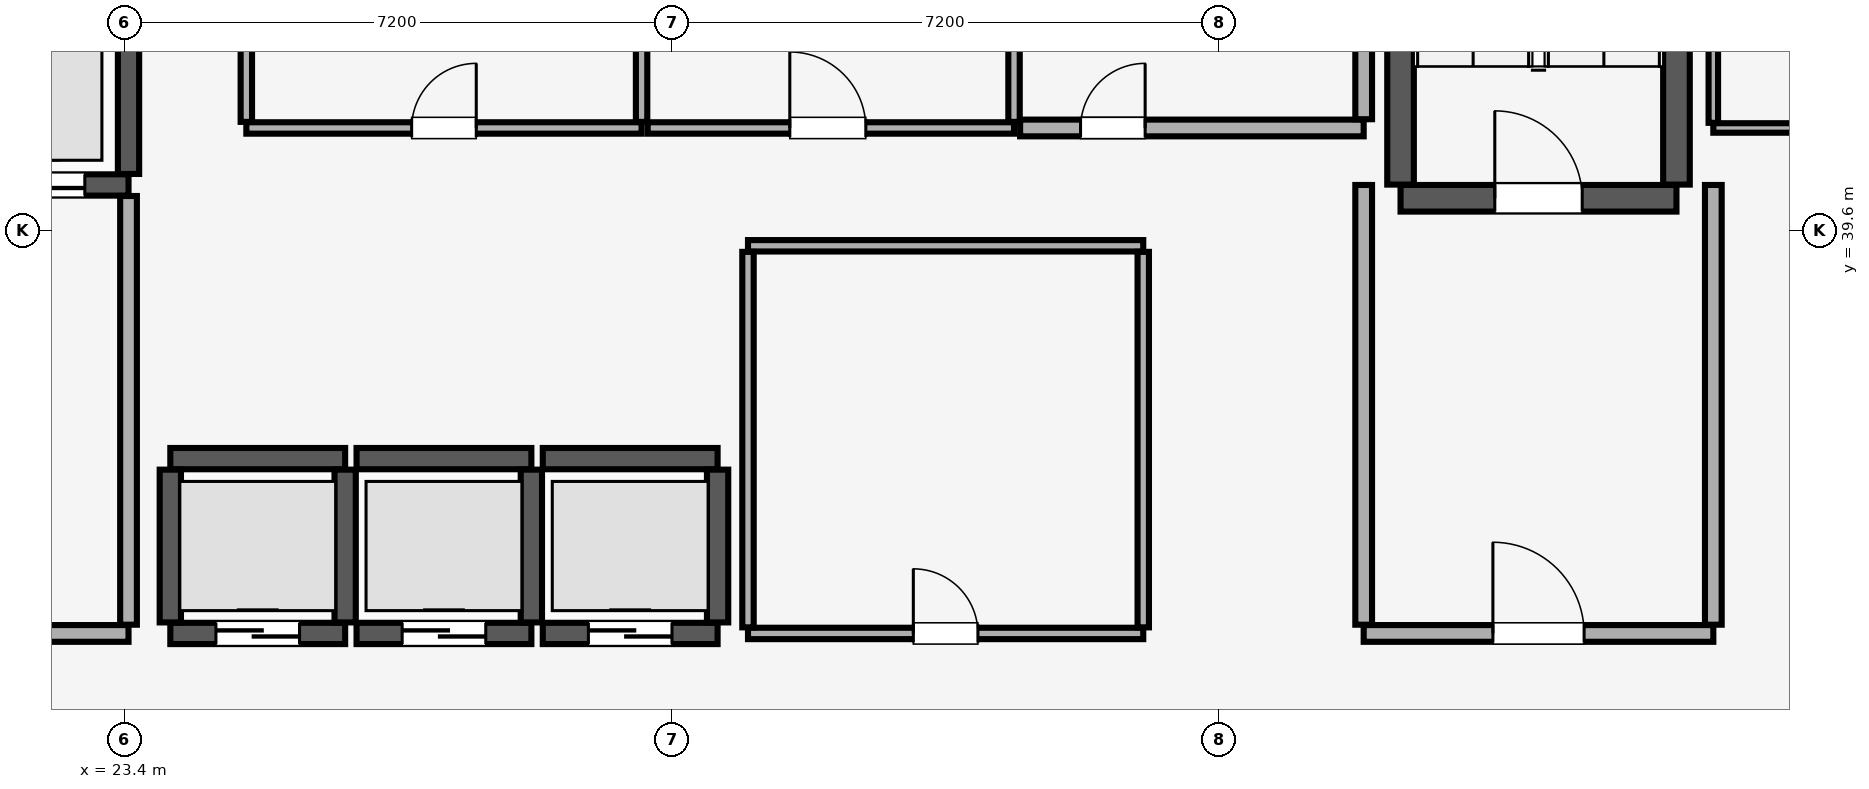
"""IFC4 building model, lengths in metres.
Left out: names, types, materials, properties, quantities, classifications, styles, units other than length and angle.
Written with IfcOpenShell. Run it as: python <this file> out.ifc"""

import sys

from ifc_helpers import new_model, si_unit, direction, frame, frame_2d, origin, place, context, subcontext, project, spatial, rectangle, extrude, element, fill, save


model = new_model("IFC4")
c1 = context("Model", 3, precision=1e-05, world=origin(), true_north=direction((0.0, 1.0)))
c2 = subcontext(c1, "Body", "Model", "MODEL_VIEW")
j1 = project(units=[si_unit("LENGTHUNIT", "METRE"), si_unit("PLANEANGLEUNIT", "RADIAN")], contexts=[c1])
p1 = place(None, origin())
s1 = spatial("IfcSite", under=j1, at=p1, CompositionType="ELEMENT")
p2 = place(p1, origin())
s2 = spatial("IfcBuilding", under=s1, at=p2, CompositionType="ELEMENT")
p3 = place(p2, frame((0.0, 0.0, 35.15)))
s3 = spatial("IfcBuildingStorey", under=s2, at=p3, CompositionType="ELEMENT", Elevation=35.15)
p4 = place(p3, frame((40.185, 40.025, 0.0), z_axis=(0.0, 0.0, 1.0), x_axis=(1.0, 0.0, 0.0)))
e1 = element("IfcWall", 1, at=p4, inside=s3, PredefinedType="SHEAR", context=c2, shape_type="SweptSolid", body=[
    extrude(rectangle(XDim=3.63, YDim=0.35, at=frame_2d((1.815, 0.0))), origin(), (0.0, 0.0, 1.0), 3.51),
])
p5 = place(p4, frame((1.24, 0.0, 0.0)))
e2 = element("IfcOpeningElement", 2, at=p5, cuts=e1, PredefinedType="OPENING", context=c2, shape_type="SweptSolid", body=[
    extrude(rectangle(XDim=1.15, YDim=2.15, at=frame_2d((0.575, 1.075))), frame((0.0, 0.185, 0.0), z_axis=(0.0, -1.0, 0.0), x_axis=(1.0, 0.0, 0.0)), (0.0, 0.0, 1.0), 0.37),
])
for number, where, z_axis, x_axis in (
    (3, (40.185, 40.205, 0.0), (0.0, 0.0, 1.0), (0.0, 1.0, 0.0)),
    (4, (43.815, 40.205, 0.0), (0.0, 0.0, 1.0), (0.0, 1.0, 0.0)),
):
    element("IfcWall", number, at=place(p3, frame(where, z_axis=z_axis, x_axis=x_axis)), inside=s3, PredefinedType="SHEAR", context=c2, shape_type="SweptSolid", body=[
        extrude(rectangle(XDim=8.09, YDim=0.35, at=frame_2d((4.045, 0.0))), origin(), (0.0, 0.0, 1.0), 3.51),
    ])
p6 = place(p3, frame((24.0, 34.3, 0.0), z_axis=(0.0, 0.0, 1.0), x_axis=(1.0, 0.0, 0.0)))
e5 = element("IfcWall", 5, at=p6, inside=s3, PredefinedType="SHEAR", context=c2, shape_type="SweptSolid", body=[
    extrude(rectangle(XDim=2.3, YDim=0.28, at=frame_2d((1.15, 0.0))), origin(), (0.0, 0.0, 1.0), 3.51),
])
p7 = place(p6, frame((0.6, 0.0, 0.0)))
e6 = element("IfcOpeningElement", 6, at=p7, cuts=e5, PredefinedType="OPENING", context=c2, shape_type="SweptSolid", body=[
    extrude(rectangle(XDim=1.1, YDim=2.2, at=frame_2d((0.55, 1.1))), frame((0.0, 0.15, 0.0), z_axis=(0.0, -1.0, 0.0), x_axis=(1.0, 0.0, 0.0)), (0.0, 0.0, 1.0), 0.3),
])
p8 = place(p3, frame((24.0, 36.6, 0.0), z_axis=(0.0, 0.0, 1.0), x_axis=(1.0, 0.0, 0.0)))
e7 = element("IfcWall", 7, at=p8, inside=s3, PredefinedType="SHEAR", context=c2, shape_type="SweptSolid", body=[
    extrude(rectangle(XDim=2.3, YDim=0.28, at=frame_2d((1.15, 0.0))), origin(), (0.0, 0.0, 1.0), 3.51),
])
for number, where, z_axis, x_axis in (
    (8, (24.0, 34.445, 0.0), (0.0, 0.0, 1.0), (0.0, 1.0, 0.0)),
    (9, (26.3, 34.445, 0.0), (0.0, 0.0, 1.0), (0.0, 1.0, 0.0)),
):
    element("IfcWall", number, at=place(p3, frame(where, z_axis=z_axis, x_axis=x_axis)), inside=s3, PredefinedType="SHEAR", context=c2, shape_type="SweptSolid", body=[
        extrude(rectangle(XDim=2.01, YDim=0.28, at=frame_2d((1.005, 0.0))), origin(), (0.0, 0.0, 1.0), 3.51),
    ])
p9 = place(p3, frame((26.45, 34.3, 0.0), z_axis=(0.0, 0.0, 1.0), x_axis=(1.0, 0.0, 0.0)))
e10 = element("IfcWall", 10, at=p9, inside=s3, PredefinedType="SHEAR", context=c2, shape_type="SweptSolid", body=[
    extrude(rectangle(XDim=2.3, YDim=0.28, at=frame_2d((1.15, 0.0))), origin(), (0.0, 0.0, 1.0), 3.51),
])
p10 = place(p9, frame((0.6, 0.0, 0.0)))
e11 = element("IfcOpeningElement", 11, at=p10, cuts=e10, PredefinedType="OPENING", context=c2, shape_type="SweptSolid", body=[
    extrude(rectangle(XDim=1.1, YDim=2.2, at=frame_2d((0.55, 1.1))), frame((0.0, 0.15, 0.0), z_axis=(0.0, -1.0, 0.0), x_axis=(1.0, 0.0, 0.0)), (0.0, 0.0, 1.0), 0.3),
])
p11 = place(p3, frame((26.45, 36.6, 0.0), z_axis=(0.0, 0.0, 1.0), x_axis=(1.0, 0.0, 0.0)))
e12 = element("IfcWall", 12, at=p11, inside=s3, PredefinedType="SHEAR", context=c2, shape_type="SweptSolid", body=[
    extrude(rectangle(XDim=2.3, YDim=0.28, at=frame_2d((1.15, 0.0))), origin(), (0.0, 0.0, 1.0), 3.51),
])
p12 = place(p3, frame((28.75, 34.445, 0.0), z_axis=(0.0, 0.0, 1.0), x_axis=(0.0, 1.0, 0.0)))
e13 = element("IfcWall", 13, at=p12, inside=s3, PredefinedType="SHEAR", context=c2, shape_type="SweptSolid", body=[
    extrude(rectangle(XDim=2.01, YDim=0.28, at=frame_2d((1.005, 0.0))), origin(), (0.0, 0.0, 1.0), 3.51),
])
p13 = place(p3, frame((28.9, 34.3, 0.0), z_axis=(0.0, 0.0, 1.0), x_axis=(1.0, 0.0, 0.0)))
e14 = element("IfcWall", 14, at=p13, inside=s3, PredefinedType="SHEAR", context=c2, shape_type="SweptSolid", body=[
    extrude(rectangle(XDim=2.3, YDim=0.28, at=frame_2d((1.15, 0.0))), origin(), (0.0, 0.0, 1.0), 3.51),
])
p14 = place(p13, frame((0.6, 0.0, 0.0)))
e15 = element("IfcOpeningElement", 15, at=p14, cuts=e14, PredefinedType="OPENING", context=c2, shape_type="SweptSolid", body=[
    extrude(rectangle(XDim=1.1, YDim=2.2, at=frame_2d((0.55, 1.1))), frame((0.0, 0.15, 0.0), z_axis=(0.0, -1.0, 0.0), x_axis=(1.0, 0.0, 0.0)), (0.0, 0.0, 1.0), 0.3),
])
p15 = place(p3, frame((28.9, 36.6, 0.0), z_axis=(0.0, 0.0, 1.0), x_axis=(1.0, 0.0, 0.0)))
e16 = element("IfcWall", 16, at=p15, inside=s3, PredefinedType="SHEAR", context=c2, shape_type="SweptSolid", body=[
    extrude(rectangle(XDim=2.3, YDim=0.28, at=frame_2d((1.15, 0.0))), origin(), (0.0, 0.0, 1.0), 3.51),
])
p16 = place(p3, frame((31.2, 34.445, 0.0), z_axis=(0.0, 0.0, 1.0), x_axis=(0.0, 1.0, 0.0)))
e17 = element("IfcWall", 17, at=p16, inside=s3, PredefinedType="SHEAR", context=c2, shape_type="SweptSolid", body=[
    extrude(rectangle(XDim=2.01, YDim=0.28, at=frame_2d((1.005, 0.0))), origin(), (0.0, 0.0, 1.0), 3.51),
])
p17 = place(p3, frame((21.035, 40.2, 0.0), z_axis=(0.0, 0.0, 1.0), x_axis=(1.0, 0.0, 0.0)))
e18 = element("IfcWall", 18, at=p17, inside=s3, PredefinedType="SHEAR", context=c2, shape_type="SweptSolid", body=[
    extrude(rectangle(XDim=2.415, YDim=0.28, at=frame_2d((1.208, 0.0))), origin(), (0.0, 0.0, 1.0), 3.51),
])
p18 = place(p17, frame((0.54, 0.0, 0.0)))
e19 = element("IfcOpeningElement", 19, at=p18, cuts=e18, PredefinedType="OPENING", context=c2, shape_type="SweptSolid", body=[
    extrude(rectangle(XDim=1.3, YDim=2.3, at=frame_2d((0.65, 1.15))), frame((0.0, 0.15, 0.0), z_axis=(0.0, -1.0, 0.0), x_axis=(1.0, 0.0, 0.0)), (0.0, 0.0, 1.0), 0.3),
])
p19 = place(p3, frame((23.45, 40.345, 0.0), z_axis=(0.0, 0.0, 1.0), x_axis=(0.0, 1.0, 0.0)))
e20 = element("IfcWall", 20, at=p19, inside=s3, PredefinedType="SHEAR", context=c2, shape_type="SweptSolid", body=[
    extrude(rectangle(XDim=2.81, YDim=0.28, at=frame_2d((1.405, 0.0))), origin(), (0.0, 0.0, 1.0), 3.51),
])
p20 = place(p3, frame((17.4, 34.3, 0.0), z_axis=(0.0, 0.0, 1.0), x_axis=(1.0, 0.0, 0.0)))
e21 = element("IfcWall", 21, at=p20, inside=s3, PredefinedType="PARTITIONING", context=c2, shape_type="SweptSolid", body=[
    extrude(rectangle(XDim=6.05, YDim=0.22, at=frame_2d((3.025, 0.0))), origin(), (0.0, 0.0, 1.0), 3.51),
])
p21 = place(p20, frame((2.2, 0.0, 0.0)))
e22 = element("IfcOpeningElement", 22, at=p21, cuts=e21, PredefinedType="OPENING", context=c2, shape_type="SweptSolid", body=[
    extrude(rectangle(XDim=1.2, YDim=2.15, at=frame_2d((0.6, 1.075))), frame((0.0, 0.12, 0.0), z_axis=(0.0, -1.0, 0.0), x_axis=(1.0, 0.0, 0.0)), (0.0, 0.0, 1.0), 0.24),
])
p22 = place(p3, frame((23.45, 34.415, 0.0), z_axis=(0.0, 0.0, 1.0), x_axis=(0.0, 1.0, 0.0)))
e23 = element("IfcWall", 23, at=p22, inside=s3, PredefinedType="PARTITIONING", context=c2, shape_type="SweptSolid", body=[
    extrude(rectangle(XDim=5.64, YDim=0.22, at=frame_2d((2.82, 0.0))), origin(), (0.0, 0.0, 1.0), 3.51),
])
p23 = place(p3, frame((39.7, 34.3, 0.0), z_axis=(0.0, 0.0, 1.0), x_axis=(1.0, 0.0, 0.0)))
e24 = element("IfcWall", 24, at=p23, inside=s3, PredefinedType="PARTITIONING", context=c2, shape_type="SweptSolid", body=[
    extrude(rectangle(XDim=4.6, YDim=0.22, at=frame_2d((2.3, 0.0))), origin(), (0.0, 0.0, 1.0), 3.51),
])
p24 = place(p23, frame((1.7, 0.0, 0.0)))
e25 = element("IfcOpeningElement", 25, at=p24, cuts=e24, PredefinedType="OPENING", context=c2, shape_type="SweptSolid", body=[
    extrude(rectangle(XDim=1.2, YDim=2.15, at=frame_2d((0.6, 1.075))), frame((0.0, 0.12, 0.0), z_axis=(0.0, -1.0, 0.0), x_axis=(1.0, 0.0, 0.0)), (0.0, 0.0, 1.0), 0.24),
])
for number, where, z_axis, x_axis in (
    (26, (39.7, 34.415, 0.0), (0.0, 0.0, 1.0), (0.0, 1.0, 0.0)),
    (27, (44.3, 34.415, 0.0), (0.0, 0.0, 1.0), (0.0, 1.0, 0.0)),
):
    element("IfcWall", number, at=place(p3, frame(where, z_axis=z_axis, x_axis=x_axis)), inside=s3, PredefinedType="PARTITIONING", context=c2, shape_type="SweptSolid", body=[
        extrude(rectangle(XDim=5.785, YDim=0.22, at=frame_2d((2.893, 0.0))), origin(), (0.0, 0.0, 1.0), 3.51),
    ])
p25 = place(p3, frame((31.6, 34.3, 0.0), z_axis=(0.0, 0.0, 1.0), x_axis=(1.0, 0.0, 0.0)))
e28 = element("IfcWall", 28, at=p25, inside=s3, PredefinedType="PARTITIONING", context=c2, shape_type="SweptSolid", body=[
    extrude(rectangle(XDim=5.2, YDim=0.15, at=frame_2d((2.6, 0.0))), origin(), (0.0, 0.0, 1.0), 3.51),
])
p26 = place(p25, frame((2.175, 0.0, 0.0)))
e29 = element("IfcOpeningElement", 29, at=p26, cuts=e28, PredefinedType="OPENING", context=c2, shape_type="SweptSolid", body=[
    extrude(rectangle(XDim=0.85, YDim=2.1, at=frame_2d((0.425, 1.05))), frame((0.0, 0.085, 0.0), z_axis=(0.0, -1.0, 0.0), x_axis=(1.0, 0.0, 0.0)), (0.0, 0.0, 1.0), 0.17),
])
p27 = place(p3, frame((31.6, 39.4, 0.0), z_axis=(0.0, 0.0, 1.0), x_axis=(1.0, 0.0, 0.0)))
e30 = element("IfcWall", 30, at=p27, inside=s3, PredefinedType="PARTITIONING", context=c2, shape_type="SweptSolid", body=[
    extrude(rectangle(XDim=5.2, YDim=0.15, at=frame_2d((2.6, 0.0))), origin(), (0.0, 0.0, 1.0), 3.51),
])
for number, where, z_axis, x_axis in (
    (31, (31.6, 34.38, 0.0), (0.0, 0.0, 1.0), (0.0, 1.0, 0.0)),
    (32, (36.8, 34.38, 0.0), (0.0, 0.0, 1.0), (0.0, 1.0, 0.0)),
):
    element("IfcWall", number, at=place(p3, frame(where, z_axis=z_axis, x_axis=x_axis)), inside=s3, PredefinedType="PARTITIONING", context=c2, shape_type="SweptSolid", body=[
        extrude(rectangle(XDim=4.94, YDim=0.15, at=frame_2d((2.47, 0.0))), origin(), (0.0, 0.0, 1.0), 3.51),
    ])
p28 = place(p3, frame((25.0, 40.95, 0.0), z_axis=(0.0, 0.0, 1.0), x_axis=(1.0, 0.0, 0.0)))
e33 = element("IfcWall", 33, at=p28, inside=s3, PredefinedType="PARTITIONING", context=c2, shape_type="SweptSolid", body=[
    extrude(rectangle(XDim=5.2, YDim=0.15, at=frame_2d((2.6, 0.0))), origin(), (0.0, 0.0, 1.0), 3.51),
])
p29 = place(p28, frame((2.175, 0.0, 0.0)))
e34 = element("IfcOpeningElement", 34, at=p29, cuts=e33, PredefinedType="OPENING", context=c2, shape_type="SweptSolid", body=[
    extrude(rectangle(XDim=0.85, YDim=2.1, at=frame_2d((0.425, 1.05))), frame((0.0, 0.085, 0.0), z_axis=(0.0, -1.0, 0.0), x_axis=(1.0, 0.0, 0.0)), (0.0, 0.0, 1.0), 0.17),
])
for number, where, z_axis, x_axis in (
    (35, (25.0, 41.03, 0.0), (0.0, 0.0, 1.0), (0.0, 1.0, 0.0)),
    (36, (30.2, 41.03, 0.0), (0.0, 0.0, 1.0), (0.0, 1.0, 0.0)),
):
    element("IfcWall", number, at=place(p3, frame(where, z_axis=z_axis, x_axis=x_axis)), inside=s3, PredefinedType="PARTITIONING", context=c2, shape_type="SweptSolid", body=[
        extrude(rectangle(XDim=7.82, YDim=0.15, at=frame_2d((3.91, 0.0))), origin(), (0.0, 0.0, 1.0), 3.51),
    ])
p30 = place(p3, frame((30.28, 40.95, 0.0), z_axis=(0.0, 0.0, 1.0), x_axis=(1.0, 0.0, 0.0)))
e37 = element("IfcWall", 37, at=p30, inside=s3, PredefinedType="PARTITIONING", context=c2, shape_type="SweptSolid", body=[
    extrude(rectangle(XDim=4.82, YDim=0.15, at=frame_2d((2.41, 0.0))), origin(), (0.0, 0.0, 1.0), 3.51),
])
p31 = place(p30, frame((1.87, 0.0, 0.0)))
e38 = element("IfcOpeningElement", 38, at=p31, cuts=e37, PredefinedType="OPENING", context=c2, shape_type="SweptSolid", body=[
    extrude(rectangle(XDim=1.0, YDim=2.15, at=frame_2d((0.5, 1.075))), frame((0.0, 0.085, 0.0), z_axis=(0.0, -1.0, 0.0), x_axis=(1.0, 0.0, 0.0)), (0.0, 0.0, 1.0), 0.17),
])
p32 = place(p3, frame((35.1, 41.03, 0.0), z_axis=(0.0, 0.0, 1.0), x_axis=(0.0, 1.0, 0.0)))
e39 = element("IfcWall", 39, at=p32, inside=s3, PredefinedType="PARTITIONING", context=c2, shape_type="SweptSolid", body=[
    extrude(rectangle(XDim=7.82, YDim=0.15, at=frame_2d((3.91, 0.0))), origin(), (0.0, 0.0, 1.0), 3.51),
])
p33 = place(p3, frame((35.18, 40.95, 0.0), z_axis=(0.0, 0.0, 1.0), x_axis=(1.0, 0.0, 0.0)))
e40 = element("IfcWall", 40, at=p33, inside=s3, PredefinedType="PARTITIONING", context=c2, shape_type="SweptSolid", body=[
    extrude(rectangle(XDim=4.52, YDim=0.22, at=frame_2d((2.26, 0.0))), origin(), (0.0, 0.0, 1.0), 3.51),
])
p34 = place(p33, frame((0.795, 0.0, 0.0)))
e41 = element("IfcOpeningElement", 41, at=p34, cuts=e40, PredefinedType="OPENING", context=c2, shape_type="SweptSolid", body=[
    extrude(rectangle(XDim=0.85, YDim=2.1, at=frame_2d((0.425, 1.05))), frame((0.0, 0.12, 0.0), z_axis=(0.0, -1.0, 0.0), x_axis=(1.0, 0.0, 0.0)), (0.0, 0.0, 1.0), 0.24),
])
p35 = place(p3, frame((39.7, 41.065, 0.0), z_axis=(0.0, 0.0, 1.0), x_axis=(0.0, 1.0, 0.0)))
e42 = element("IfcWall", 42, at=p35, inside=s3, PredefinedType="PARTITIONING", context=c2, shape_type="SweptSolid", body=[
    extrude(rectangle(XDim=7.785, YDim=0.22, at=frame_2d((3.893, 0.0))), origin(), (0.0, 0.0, 1.0), 3.51),
])
p36 = place(p3, frame((44.3, 40.95, 0.0), z_axis=(0.0, 0.0, 1.0), x_axis=(1.0, 0.0, 0.0)))
e43 = element("IfcWall", 43, at=p36, inside=s3, PredefinedType="PARTITIONING", context=c2, shape_type="SweptSolid", body=[
    extrude(rectangle(XDim=3.1, YDim=0.125, at=frame_2d((1.55, 0.0))), origin(), (0.0, 0.0, 1.0), 3.51),
])
p37 = place(p36, frame((1.1, 0.0, 0.0)))
e44 = element("IfcOpeningElement", 44, at=p37, cuts=e43, PredefinedType="OPENING", context=c2, shape_type="SweptSolid", body=[
    extrude(rectangle(XDim=0.9, YDim=2.1, at=frame_2d((0.45, 1.05))), frame((0.0, 0.073, 0.0), z_axis=(0.0, -1.0, 0.0), x_axis=(1.0, 0.0, 0.0)), (0.0, 0.0, 1.0), 0.145),
])
p38 = place(p3, frame((44.3, 41.018, 0.0), z_axis=(0.0, 0.0, 1.0), x_axis=(0.0, 1.0, 0.0)))
e45 = element("IfcWall", 45, at=p38, inside=s3, PredefinedType="PARTITIONING", context=c2, shape_type="SweptSolid", body=[
    extrude(rectangle(XDim=7.833, YDim=0.125, at=frame_2d((3.916, 0.0))), origin(), (0.0, 0.0, 1.0), 3.51),
])
p39 = place(p5, origin())
e46 = element("IfcDoor", 46, at=p39, inside=s3, OperationType="SINGLE_SWING_LEFT", PredefinedType="DOOR", context=c2, shape_type="SweptSolid", body=[
    extrude(rectangle(XDim=1.15, YDim=2.15, at=frame_2d((0.575, 1.075))), frame((0.0, 0.025, 0.0), z_axis=(0.0, -1.0, 0.0), x_axis=(1.0, 0.0, 0.0)), (0.0, 0.0, 1.0), 0.05),
])
fill(e2, e46)
p40 = place(p7, origin())
e47 = element("IfcDoor", 47, at=p40, inside=s3, OperationType="DOUBLE_DOOR_SLIDING", PredefinedType="DOOR", context=c2, shape_type="SweptSolid", body=[
    extrude(rectangle(XDim=1.1, YDim=2.2, at=frame_2d((0.55, 1.1))), frame((0.0, 0.025, 0.0), z_axis=(0.0, -1.0, 0.0), x_axis=(1.0, 0.0, 0.0)), (0.0, 0.0, 1.0), 0.05),
])
fill(e6, e47)
p41 = place(p10, origin())
e48 = element("IfcDoor", 48, at=p41, inside=s3, OperationType="DOUBLE_DOOR_SLIDING", PredefinedType="DOOR", context=c2, shape_type="SweptSolid", body=[
    extrude(rectangle(XDim=1.1, YDim=2.2, at=frame_2d((0.55, 1.1))), frame((0.0, 0.025, 0.0), z_axis=(0.0, -1.0, 0.0), x_axis=(1.0, 0.0, 0.0)), (0.0, 0.0, 1.0), 0.05),
])
fill(e11, e48)
p42 = place(p14, origin())
e49 = element("IfcDoor", 49, at=p42, inside=s3, OperationType="DOUBLE_DOOR_SLIDING", PredefinedType="DOOR", context=c2, shape_type="SweptSolid", body=[
    extrude(rectangle(XDim=1.1, YDim=2.2, at=frame_2d((0.55, 1.1))), frame((0.0, 0.025, 0.0), z_axis=(0.0, -1.0, 0.0), x_axis=(1.0, 0.0, 0.0)), (0.0, 0.0, 1.0), 0.05),
])
fill(e15, e49)
p43 = place(p18, origin())
e50 = element("IfcDoor", 50, at=p43, inside=s3, OperationType="DOUBLE_DOOR_SLIDING", PredefinedType="DOOR", context=c2, shape_type="SweptSolid", body=[
    extrude(rectangle(XDim=1.3, YDim=2.3, at=frame_2d((0.65, 1.15))), frame((0.0, 0.025, 0.0), z_axis=(0.0, -1.0, 0.0), x_axis=(1.0, 0.0, 0.0)), (0.0, 0.0, 1.0), 0.05),
])
fill(e19, e50)
p44 = place(p24, origin())
e51 = element("IfcDoor", 51, at=p44, inside=s3, OperationType="SINGLE_SWING_LEFT", PredefinedType="DOOR", context=c2, shape_type="SweptSolid", body=[
    extrude(rectangle(XDim=1.2, YDim=2.15, at=frame_2d((0.6, 1.075))), frame((0.0, 0.025, 0.0), z_axis=(0.0, -1.0, 0.0), x_axis=(1.0, 0.0, 0.0)), (0.0, 0.0, 1.0), 0.05),
])
fill(e25, e51)
p45 = place(p26, origin())
e52 = element("IfcDoor", 52, at=p45, inside=s3, OperationType="SINGLE_SWING_LEFT", PredefinedType="DOOR", context=c2, shape_type="SweptSolid", body=[
    extrude(rectangle(XDim=0.85, YDim=2.1, at=frame_2d((0.425, 1.05))), frame((0.0, 0.025, 0.0), z_axis=(0.0, -1.0, 0.0), x_axis=(1.0, 0.0, 0.0)), (0.0, 0.0, 1.0), 0.05),
])
fill(e29, e52)
p46 = place(p29, origin())
e53 = element("IfcDoor", 53, at=p46, inside=s3, OperationType="SINGLE_SWING_RIGHT", PredefinedType="DOOR", context=c2, shape_type="SweptSolid", body=[
    extrude(rectangle(XDim=0.85, YDim=2.1, at=frame_2d((0.425, 1.05))), frame((0.0, 0.025, 0.0), z_axis=(0.0, -1.0, 0.0), x_axis=(1.0, 0.0, 0.0)), (0.0, 0.0, 1.0), 0.05),
])
fill(e34, e53)
p47 = place(p31, origin())
e54 = element("IfcDoor", 54, at=p47, inside=s3, OperationType="SINGLE_SWING_LEFT", PredefinedType="DOOR", context=c2, shape_type="SweptSolid", body=[
    extrude(rectangle(XDim=1.0, YDim=2.15, at=frame_2d((0.5, 1.075))), frame((0.0, 0.025, 0.0), z_axis=(0.0, -1.0, 0.0), x_axis=(1.0, 0.0, 0.0)), (0.0, 0.0, 1.0), 0.05),
])
fill(e38, e54)
p48 = place(p34, origin())
e55 = element("IfcDoor", 55, at=p48, inside=s3, OperationType="SINGLE_SWING_RIGHT", PredefinedType="DOOR", context=c2, shape_type="SweptSolid", body=[
    extrude(rectangle(XDim=0.85, YDim=2.1, at=frame_2d((0.425, 1.05))), frame((0.0, 0.025, 0.0), z_axis=(0.0, -1.0, 0.0), x_axis=(1.0, 0.0, 0.0)), (0.0, 0.0, 1.0), 0.05),
])
fill(e41, e55)
save(model, sys.argv[1])
